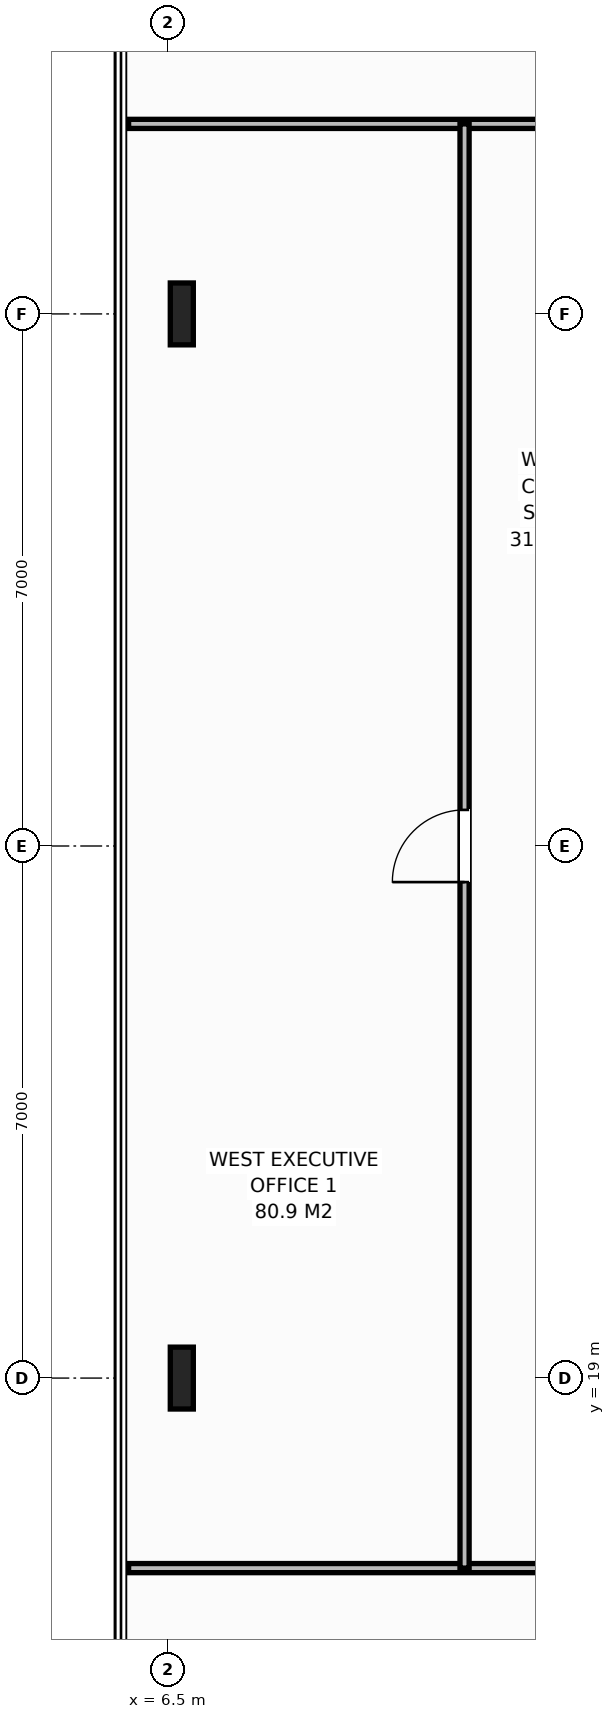
"""IFC4 building model, lengths in metres.
Left out: names, types, materials, properties, quantities, classifications, styles, units other than length and angle.
Written with IfcOpenShell. Run it as: python <this file> out.ifc"""

import sys

from ifc_helpers import new_model, si_unit, direction, frame, frame_2d, origin, origin_2d, place, context, subcontext, project, spatial, rectangle, i_section, extrude, element, fill, save


model = new_model("IFC4")
c1 = context("Model", 3, precision=1e-05, world=origin(), true_north=direction((0.0, 1.0)))
c2 = subcontext(c1, "Body", "Model", "MODEL_VIEW")
j1 = project(units=[si_unit("LENGTHUNIT", "METRE"), si_unit("PLANEANGLEUNIT", "RADIAN")], contexts=[c1])
p1 = place(None, origin())
s1 = spatial("IfcSite", under=j1, at=p1, CompositionType="ELEMENT")
p2 = place(p1, origin())
s2 = spatial("IfcBuilding", under=s1, at=p2, CompositionType="ELEMENT")
p3 = place(p2, frame((0.0, 0.0, 210.0)))
s3 = spatial("IfcBuildingStorey", under=s2, at=p3, CompositionType="ELEMENT", Elevation=210.0)
for number, where, z_axis, x_axis in (
    (1, (6.68, 19.0, 0.0), (0.0, 0.0, 1.0), (1.0, 0.0, 0.0)),
    (2, (6.68, 33.0, 0.0), (0.0, 0.0, 1.0), (1.0, 0.0, 0.0)),
):
    element("IfcColumn", number, at=place(p3, frame(where, z_axis=z_axis, x_axis=x_axis)), inside=s3, PredefinedType="COLUMN", context=c2, shape_type="SweptSolid", body=[
        extrude(i_section(OverallWidth=0.303, OverallDepth=0.814, WebThickness=0.021, FlangeThickness=0.04, at=origin_2d()), origin(), (0.0, 0.0, 1.0), 3.8),
    ])
p4 = place(p3, frame((5.98, 35.5, 0.0), z_axis=(0.0, 0.0, 1.0), x_axis=(1.0, 0.0, 0.0)))
e3 = element("IfcWall", 3, at=p4, inside=s3, PredefinedType="PARTITIONING", context=c2, shape_type="SweptSolid", body=[
    extrude(rectangle(XDim=14.569, YDim=0.12, at=frame_2d((7.284, 0.0))), origin(), (0.0, 0.0, 1.0), 3.58),
])
p5 = place(p4, frame((9.02, 0.0, 0.0)))
e4 = element("IfcOpeningElement", 4, at=p5, cuts=e3, PredefinedType="OPENING", context=c2, shape_type="SweptSolid", body=[
    extrude(rectangle(XDim=0.95, YDim=2.15, at=frame_2d((0.475, 1.075))), frame((0.0, 0.07, 0.0), z_axis=(0.0, -1.0, 0.0), x_axis=(1.0, 0.0, 0.0)), (0.0, 0.0, 1.0), 0.14),
])
p6 = place(p3, frame((5.98, 16.5, 0.0), z_axis=(0.0, 0.0, 1.0), x_axis=(1.0, 0.0, 0.0)))
e5 = element("IfcWall", 5, at=p6, inside=s3, PredefinedType="PARTITIONING", context=c2, shape_type="SweptSolid", body=[
    extrude(rectangle(XDim=13.643, YDim=0.12, at=frame_2d((6.822, 0.0))), origin(), (0.0, 0.0, 1.0), 3.58),
])
p7 = place(p6, frame((8.557, 0.0, 0.0)))
e6 = element("IfcOpeningElement", 6, at=p7, cuts=e5, PredefinedType="OPENING", context=c2, shape_type="SweptSolid", body=[
    extrude(rectangle(XDim=0.95, YDim=2.15, at=frame_2d((0.475, 1.075))), frame((0.0, 0.07, 0.0), z_axis=(0.0, -1.0, 0.0), x_axis=(1.0, 0.0, 0.0)), (0.0, 0.0, 1.0), 0.14),
])
p8 = place(p3, frame((10.4, 16.5, 0.0), z_axis=(0.0, 0.0, 1.0), x_axis=(0.0, 1.0, 0.0)))
e7 = element("IfcWall", 7, at=p8, inside=s3, PredefinedType="PARTITIONING", context=c2, shape_type="SweptSolid", body=[
    extrude(rectangle(XDim=19.0, YDim=0.12, at=frame_2d((9.5, 0.0))), origin(), (0.0, 0.0, 1.0), 3.58),
])
p9 = place(p8, frame((9.025, 0.0, 0.0)))
e8 = element("IfcOpeningElement", 8, at=p9, cuts=e7, PredefinedType="OPENING", context=c2, shape_type="SweptSolid", body=[
    extrude(rectangle(XDim=0.95, YDim=2.15, at=frame_2d((0.475, 1.075))), frame((0.0, 0.07, 0.0), z_axis=(0.0, -1.0, 0.0), x_axis=(1.0, 0.0, 0.0)), (0.0, 0.0, 1.0), 0.14),
])
p10 = place(p9, origin())
e9 = element("IfcDoor", 9, at=p10, inside=s3, OperationType="SINGLE_SWING_LEFT", PredefinedType="DOOR", context=c2, shape_type="SweptSolid", body=[
    extrude(rectangle(XDim=0.95, YDim=2.15, at=frame_2d((0.475, 1.075))), frame((0.0, 0.025, 0.0), z_axis=(0.0, -1.0, 0.0), x_axis=(1.0, 0.0, 0.0)), (0.0, 0.0, 1.0), 0.05),
])
fill(e8, e9)
save(model, sys.argv[1])
